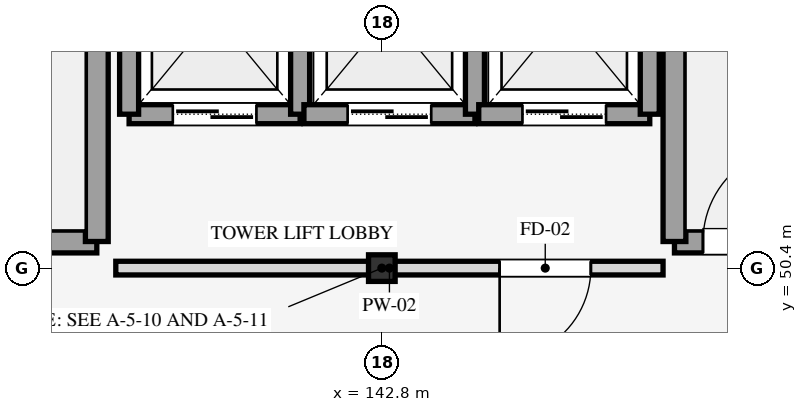
"""IFC4 building model, lengths in metres.
Left out: names, types, materials, properties, quantities, classifications, styles, units other than length and angle.
Written with IfcOpenShell. Run it as: python <this file> out.ifc"""

import sys

from ifc_helpers import new_model, si_unit, direction, frame, frame_2d, origin, origin_2d, place, context, subcontext, project, spatial, rectangle, i_section, extrude, element, fill, save


model = new_model("IFC4")
c1 = context("Model", 3, precision=1e-05, world=origin(), true_north=direction((0.0, 1.0)))
c2 = subcontext(c1, "Body", "Model", "MODEL_VIEW")
j1 = project(units=[si_unit("LENGTHUNIT", "METRE"), si_unit("PLANEANGLEUNIT", "RADIAN")], contexts=[c1])
p1 = place(None, origin())
s1 = spatial("IfcSite", under=j1, at=p1, CompositionType="ELEMENT")
p2 = place(p1, origin())
s2 = spatial("IfcBuilding", under=s1, at=p2, CompositionType="ELEMENT")
p3 = place(p2, frame((0.0, 0.0, 40.5)))
s3 = spatial("IfcBuildingStorey", under=s2, at=p3, CompositionType="ELEMENT", Elevation=40.5)
p4 = place(p3, frame((142.8, 50.4, 0.0), z_axis=(0.0, 0.0, 1.0), x_axis=(1.0, 0.0, 0.0)))
e1 = element("IfcColumn", 1, at=p4, inside=s3, PredefinedType="COLUMN", context=c2, shape_type="SweptSolid", body=[
    extrude(i_section(OverallWidth=0.35, OverallDepth=0.35, WebThickness=0.012, FlangeThickness=0.019, FilletRadius=0.02, at=origin_2d()), origin(), (0.0, 0.0, 1.0), 4.2),
])
p5 = place(p3, frame((135.05, 50.75, 0.0), z_axis=(0.0, 0.0, 1.0), x_axis=(1.0, 0.0, 0.0)))
e2 = element("IfcWall", 2, at=p5, inside=s3, PredefinedType="SHEAR", context=c2, shape_type="SweptSolid", body=[
    extrude(rectangle(XDim=4.0, YDim=0.3, at=frame_2d((2.0, 0.0))), origin(), (0.0, 0.0, 1.0), 4.2),
])
p6 = place(p5, frame((0.375, 0.0, 0.0)))
e3 = element("IfcOpeningElement", 3, at=p6, cuts=e2, PredefinedType="OPENING", context=c2, shape_type="SweptSolid", body=[
    extrude(rectangle(XDim=1.25, YDim=2.15, at=frame_2d((0.625, 1.075))), frame((0.0, 0.16, 0.0), z_axis=(0.0, -1.0, 0.0), x_axis=(1.0, 0.0, 0.0)), (0.0, 0.0, 1.0), 0.32),
])
p7 = place(p3, frame((139.05, 50.75, 0.0), z_axis=(0.0, 0.0, 1.0), x_axis=(0.0, 1.0, 0.0)))
e4 = element("IfcWall", 4, at=p7, inside=s3, PredefinedType="SHEAR", context=c2, shape_type="SweptSolid", body=[
    extrude(rectangle(XDim=14.3, YDim=0.3, at=frame_2d((7.15, 0.0))), origin(), (0.0, 0.0, 1.0), 4.2),
])
p8 = place(p3, frame((146.65, 50.75, 0.0), z_axis=(0.0, 0.0, 1.0), x_axis=(1.0, 0.0, 0.0)))
e5 = element("IfcWall", 5, at=p8, inside=s3, PredefinedType="SHEAR", context=c2, shape_type="SweptSolid", body=[
    extrude(rectangle(XDim=4.0, YDim=0.3, at=frame_2d((2.0, 0.0))), origin(), (0.0, 0.0, 1.0), 4.2),
])
p9 = place(p8, frame((0.375, 0.0, 0.0)))
e6 = element("IfcOpeningElement", 6, at=p9, cuts=e5, PredefinedType="OPENING", context=c2, shape_type="SweptSolid", body=[
    extrude(rectangle(XDim=1.25, YDim=2.15, at=frame_2d((0.625, 1.075))), frame((0.0, 0.16, 0.0), z_axis=(0.0, -1.0, 0.0), x_axis=(1.0, 0.0, 0.0)), (0.0, 0.0, 1.0), 0.32),
])
p10 = place(p3, frame((146.65, 50.75, 0.0), z_axis=(0.0, 0.0, 1.0), x_axis=(0.0, 1.0, 0.0)))
e7 = element("IfcWall", 7, at=p10, inside=s3, PredefinedType="SHEAR", context=c2, shape_type="SweptSolid", body=[
    extrude(rectangle(XDim=14.3, YDim=0.3, at=frame_2d((7.15, 0.0))), origin(), (0.0, 0.0, 1.0), 4.2),
])
p11 = place(p3, frame((139.475, 52.425, 0.0), z_axis=(0.0, 0.0, 1.0), x_axis=(1.0, 0.0, 0.0)))
e8 = element("IfcWall", 8, at=p11, inside=s3, PredefinedType="SHEAR", context=c2, shape_type="SweptSolid", body=[
    extrude(rectangle(XDim=2.25, YDim=0.25, at=frame_2d((1.125, 0.0))), origin(), (0.0, 0.0, 1.0), 3.96),
])
p12 = place(p11, frame((0.575, 0.0, 0.0)))
e9 = element("IfcOpeningElement", 9, at=p12, cuts=e8, PredefinedType="OPENING", context=c2, shape_type="SweptSolid", body=[
    extrude(rectangle(XDim=1.1, YDim=2.15, at=frame_2d((0.55, 1.075))), frame((0.0, 0.135, 0.0), z_axis=(0.0, -1.0, 0.0), x_axis=(1.0, 0.0, 0.0)), (0.0, 0.0, 1.0), 0.27),
])
for number, where, z_axis, x_axis in (
    (10, (139.475, 52.425, 0.0), (0.0, 0.0, 1.0), (0.0, 1.0, 0.0)),
    (11, (141.725, 52.425, 0.0), (0.0, 0.0, 1.0), (0.0, 1.0, 0.0)),
):
    element("IfcWall", number, at=place(p3, frame(where, z_axis=z_axis, x_axis=x_axis)), inside=s3, PredefinedType="SHEAR", context=c2, shape_type="SweptSolid", body=[
        extrude(rectangle(XDim=2.65, YDim=0.25, at=frame_2d((1.325, 0.0))), origin(), (0.0, 0.0, 1.0), 3.96),
    ])
p13 = place(p3, frame((141.775, 52.425, 0.0), z_axis=(0.0, 0.0, 1.0), x_axis=(1.0, 0.0, 0.0)))
e12 = element("IfcWall", 12, at=p13, inside=s3, PredefinedType="SHEAR", context=c2, shape_type="SweptSolid", body=[
    extrude(rectangle(XDim=2.25, YDim=0.25, at=frame_2d((1.125, 0.0))), origin(), (0.0, 0.0, 1.0), 3.96),
])
p14 = place(p13, frame((0.575, 0.0, 0.0)))
e13 = element("IfcOpeningElement", 13, at=p14, cuts=e12, PredefinedType="OPENING", context=c2, shape_type="SweptSolid", body=[
    extrude(rectangle(XDim=1.1, YDim=2.15, at=frame_2d((0.55, 1.075))), frame((0.0, 0.135, 0.0), z_axis=(0.0, -1.0, 0.0), x_axis=(1.0, 0.0, 0.0)), (0.0, 0.0, 1.0), 0.27),
])
p15 = place(p3, frame((144.025, 52.425, 0.0), z_axis=(0.0, 0.0, 1.0), x_axis=(0.0, 1.0, 0.0)))
e14 = element("IfcWall", 14, at=p15, inside=s3, PredefinedType="SHEAR", context=c2, shape_type="SweptSolid", body=[
    extrude(rectangle(XDim=2.65, YDim=0.25, at=frame_2d((1.325, 0.0))), origin(), (0.0, 0.0, 1.0), 3.96),
])
p16 = place(p3, frame((144.075, 52.425, 0.0), z_axis=(0.0, 0.0, 1.0), x_axis=(1.0, 0.0, 0.0)))
e15 = element("IfcWall", 15, at=p16, inside=s3, PredefinedType="SHEAR", context=c2, shape_type="SweptSolid", body=[
    extrude(rectangle(XDim=2.25, YDim=0.25, at=frame_2d((1.125, 0.0))), origin(), (0.0, 0.0, 1.0), 3.96),
])
p17 = place(p16, frame((0.575, 0.0, 0.0)))
e16 = element("IfcOpeningElement", 16, at=p17, cuts=e15, PredefinedType="OPENING", context=c2, shape_type="SweptSolid", body=[
    extrude(rectangle(XDim=1.1, YDim=2.15, at=frame_2d((0.55, 1.075))), frame((0.0, 0.135, 0.0), z_axis=(0.0, -1.0, 0.0), x_axis=(1.0, 0.0, 0.0)), (0.0, 0.0, 1.0), 0.27),
])
p18 = place(p3, frame((146.325, 52.425, 0.0), z_axis=(0.0, 0.0, 1.0), x_axis=(0.0, 1.0, 0.0)))
e17 = element("IfcWall", 17, at=p18, inside=s3, PredefinedType="SHEAR", context=c2, shape_type="SweptSolid", body=[
    extrude(rectangle(XDim=2.65, YDim=0.25, at=frame_2d((1.325, 0.0))), origin(), (0.0, 0.0, 1.0), 3.96),
])
p19 = place(p3, frame((139.3, 50.4, 0.0), z_axis=(0.0, 0.0, 1.0), x_axis=(1.0, 0.0, 0.0)))
e18 = element("IfcWall", 18, at=p19, inside=s3, PredefinedType="PARTITIONING", context=c2, shape_type="SweptSolid", body=[
    extrude(rectangle(XDim=7.2, YDim=0.18, at=frame_2d((3.6, 0.0))), origin(), (0.0, 0.0, 1.0), 3.24),
])
p20 = place(p19, frame((5.05, 0.0, 0.0)))
e19 = element("IfcOpeningElement", 19, at=p20, cuts=e18, PredefinedType="OPENING", context=c2, shape_type="SweptSolid", body=[
    extrude(rectangle(XDim=1.2, YDim=2.15, at=frame_2d((0.6, 1.075))), frame((0.0, 0.1, 0.0), z_axis=(0.0, -1.0, 0.0), x_axis=(1.0, 0.0, 0.0)), (0.0, 0.0, 1.0), 0.2),
])
p21 = place(p9, origin())
e20 = element("IfcDoor", 20, at=p21, inside=s3, OperationType="SINGLE_SWING_RIGHT", PredefinedType="DOOR", context=c2, shape_type="SweptSolid", body=[
    extrude(rectangle(XDim=1.25, YDim=2.15, at=frame_2d((0.625, 1.075))), frame((0.0, 0.025, 0.0), z_axis=(0.0, -1.0, 0.0), x_axis=(1.0, 0.0, 0.0)), (0.0, 0.0, 1.0), 0.05),
])
fill(e6, e20)
p22 = place(p12, origin())
e21 = element("IfcDoor", 21, at=p22, inside=s3, OperationType="DOUBLE_DOOR_SLIDING", PredefinedType="DOOR", context=c2, shape_type="SweptSolid", body=[
    extrude(rectangle(XDim=1.1, YDim=2.15, at=frame_2d((0.55, 1.075))), frame((0.0, 0.025, 0.0), z_axis=(0.0, -1.0, 0.0), x_axis=(1.0, 0.0, 0.0)), (0.0, 0.0, 1.0), 0.05),
])
fill(e9, e21)
p23 = place(p14, origin())
e22 = element("IfcDoor", 22, at=p23, inside=s3, OperationType="DOUBLE_DOOR_SLIDING", PredefinedType="DOOR", context=c2, shape_type="SweptSolid", body=[
    extrude(rectangle(XDim=1.1, YDim=2.15, at=frame_2d((0.55, 1.075))), frame((0.0, 0.025, 0.0), z_axis=(0.0, -1.0, 0.0), x_axis=(1.0, 0.0, 0.0)), (0.0, 0.0, 1.0), 0.05),
])
fill(e13, e22)
p24 = place(p17, origin())
e23 = element("IfcDoor", 23, at=p24, inside=s3, OperationType="DOUBLE_DOOR_SLIDING", PredefinedType="DOOR", context=c2, shape_type="SweptSolid", body=[
    extrude(rectangle(XDim=1.1, YDim=2.15, at=frame_2d((0.55, 1.075))), frame((0.0, 0.025, 0.0), z_axis=(0.0, -1.0, 0.0), x_axis=(1.0, 0.0, 0.0)), (0.0, 0.0, 1.0), 0.05),
])
fill(e16, e23)
p25 = place(p20, frame((1.2, 0.0, 0.0), z_axis=(0.0, 0.0, 1.0), x_axis=(-1.0, 0.0, 0.0)))
e24 = element("IfcDoor", 24, at=p25, inside=s3, OperationType="SINGLE_SWING_RIGHT", PredefinedType="DOOR", context=c2, shape_type="SweptSolid", body=[
    extrude(rectangle(XDim=1.2, YDim=2.15, at=frame_2d((0.6, 1.075))), frame((0.0, 0.025, 0.0), z_axis=(0.0, -1.0, 0.0), x_axis=(1.0, 0.0, 0.0)), (0.0, 0.0, 1.0), 0.05),
])
fill(e19, e24)
save(model, sys.argv[1])
